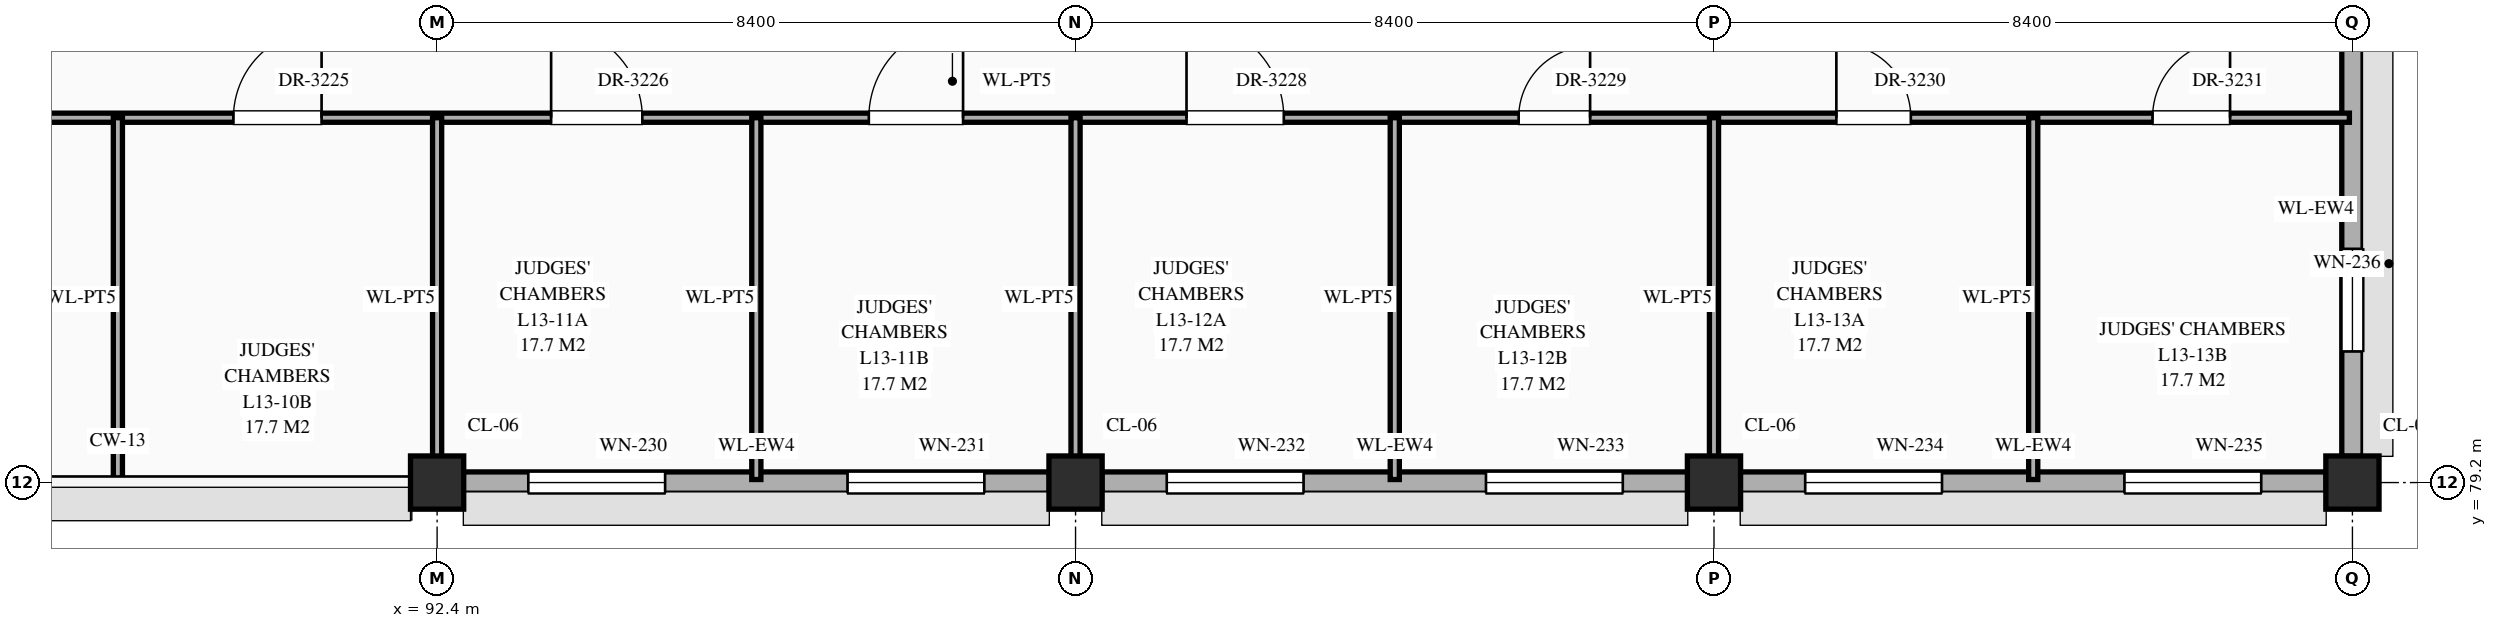
"""IFC4 building model, lengths in metres.
Left out: names, types, materials, properties, quantities, classifications, styles, units other than length and angle.
Written with IfcOpenShell. Run it as: python <this file> out.ifc"""

import sys

from ifc_helpers import new_model, si_unit, direction, frame, frame_2d, origin, origin_2d, place, context, subcontext, project, spatial, rectangle, extrude, element, fill, save


model = new_model("IFC4")
c1 = context("Model", 3, precision=1e-05, world=origin(), true_north=direction((0.0, 1.0)))
c2 = subcontext(c1, "Body", "Model", "MODEL_VIEW")
j1 = project(units=[si_unit("LENGTHUNIT", "METRE"), si_unit("PLANEANGLEUNIT", "RADIAN")], contexts=[c1])
p1 = place(None, origin())
s1 = spatial("IfcSite", under=j1, at=p1, CompositionType="ELEMENT")
p2 = place(p1, origin())
s2 = spatial("IfcBuilding", under=s1, at=p2, CompositionType="ELEMENT")
p3 = place(p2, frame((0.0, 0.0, 56.1)))
s3 = spatial("IfcBuildingStorey", under=s2, at=p3, CompositionType="ELEMENT", Elevation=56.1)
for number, where, z_axis, x_axis in (
    (1, (92.4, 79.2, 0.0), (0.0, 0.0, 1.0), (1.0, 0.0, 0.0)),
    (2, (100.8, 79.2, 0.0), (0.0, 0.0, 1.0), (1.0, 0.0, 0.0)),
    (3, (109.2, 79.2, 0.0), (0.0, 0.0, 1.0), (1.0, 0.0, 0.0)),
    (4, (117.6, 79.2, 0.0), (0.0, 0.0, 1.0), (1.0, 0.0, 0.0)),
):
    element("IfcColumn", number, at=place(p3, frame(where, z_axis=z_axis, x_axis=x_axis)), inside=s3, PredefinedType="COLUMN", context=c2, shape_type="SweptSolid", body=[
        extrude(rectangle(XDim=0.7, YDim=0.7, at=origin_2d()), origin(), (0.0, 0.0, 1.0), 4.2),
    ])
p4 = place(p3, frame((92.745, 79.2, 0.0), z_axis=(0.0, 0.0, 1.0), x_axis=(1.0, 0.0, 0.0)))
e5 = element("IfcWall", 5, at=p4, inside=s3, PredefinedType="STANDARD", context=c2, shape_type="SweptSolid", body=[
    extrude(rectangle(XDim=7.71, YDim=0.28, at=frame_2d((3.855, 0.0))), origin(), (0.0, 0.0, 1.0), 3.31),
])
p5 = place(p4, frame((0.855, 0.0, 0.55)))
e6 = element("IfcOpeningElement", 6, at=p5, cuts=e5, PredefinedType="OPENING", context=c2, shape_type="SweptSolid", body=[
    extrude(rectangle(XDim=1.8, YDim=2.12, at=frame_2d((0.9, 1.06))), frame((0.0, 0.152, 0.0), z_axis=(0.0, -1.0, 0.0), x_axis=(1.0, 0.0, 0.0)), (0.0, 0.0, 1.0), 0.304),
])
p6 = place(p4, frame((5.055, 0.0, 0.55)))
e7 = element("IfcOpeningElement", 7, at=p6, cuts=e5, PredefinedType="OPENING", context=c2, shape_type="SweptSolid", body=[
    extrude(rectangle(XDim=1.8, YDim=2.12, at=frame_2d((0.9, 1.06))), frame((0.0, 0.152, 0.0), z_axis=(0.0, -1.0, 0.0), x_axis=(1.0, 0.0, 0.0)), (0.0, 0.0, 1.0), 0.304),
])
p7 = place(p3, frame((101.145, 79.2, 0.0), z_axis=(0.0, 0.0, 1.0), x_axis=(1.0, 0.0, 0.0)))
e8 = element("IfcWall", 8, at=p7, inside=s3, PredefinedType="STANDARD", context=c2, shape_type="SweptSolid", body=[
    extrude(rectangle(XDim=7.71, YDim=0.28, at=frame_2d((3.855, 0.0))), origin(), (0.0, 0.0, 1.0), 3.31),
])
p8 = place(p7, frame((0.855, 0.0, 0.55)))
e9 = element("IfcOpeningElement", 9, at=p8, cuts=e8, PredefinedType="OPENING", context=c2, shape_type="SweptSolid", body=[
    extrude(rectangle(XDim=1.8, YDim=2.12, at=frame_2d((0.9, 1.06))), frame((0.0, 0.152, 0.0), z_axis=(0.0, -1.0, 0.0), x_axis=(1.0, 0.0, 0.0)), (0.0, 0.0, 1.0), 0.304),
])
p9 = place(p7, frame((5.055, 0.0, 0.55)))
e10 = element("IfcOpeningElement", 10, at=p9, cuts=e8, PredefinedType="OPENING", context=c2, shape_type="SweptSolid", body=[
    extrude(rectangle(XDim=1.8, YDim=2.12, at=frame_2d((0.9, 1.06))), frame((0.0, 0.152, 0.0), z_axis=(0.0, -1.0, 0.0), x_axis=(1.0, 0.0, 0.0)), (0.0, 0.0, 1.0), 0.304),
])
p10 = place(p3, frame((109.545, 79.2, 0.0), z_axis=(0.0, 0.0, 1.0), x_axis=(1.0, 0.0, 0.0)))
e11 = element("IfcWall", 11, at=p10, inside=s3, PredefinedType="STANDARD", context=c2, shape_type="SweptSolid", body=[
    extrude(rectangle(XDim=7.71, YDim=0.28, at=frame_2d((3.855, 0.0))), origin(), (0.0, 0.0, 1.0), 3.2),
])
p11 = place(p10, frame((0.855, 0.0, 0.55)))
e12 = element("IfcOpeningElement", 12, at=p11, cuts=e11, PredefinedType="OPENING", context=c2, shape_type="SweptSolid", body=[
    extrude(rectangle(XDim=1.8, YDim=2.12, at=frame_2d((0.9, 1.06))), frame((0.0, 0.152, 0.0), z_axis=(0.0, -1.0, 0.0), x_axis=(1.0, 0.0, 0.0)), (0.0, 0.0, 1.0), 0.304),
])
p12 = place(p10, frame((5.055, 0.0, 0.55)))
e13 = element("IfcOpeningElement", 13, at=p12, cuts=e11, PredefinedType="OPENING", context=c2, shape_type="SweptSolid", body=[
    extrude(rectangle(XDim=1.8, YDim=2.12, at=frame_2d((0.9, 1.06))), frame((0.0, 0.152, 0.0), z_axis=(0.0, -1.0, 0.0), x_axis=(1.0, 0.0, 0.0)), (0.0, 0.0, 1.0), 0.304),
])
p13 = place(p3, frame((117.6, 79.545, 0.0), z_axis=(0.0, 0.0, 1.0), x_axis=(0.0, 1.0, 0.0)))
e14 = element("IfcWall", 14, at=p13, inside=s3, PredefinedType="STANDARD", context=c2, shape_type="SweptSolid", body=[
    extrude(rectangle(XDim=6.51, YDim=0.28, at=frame_2d((3.255, 0.0))), origin(), (0.0, 0.0, 1.0), 3.2),
])
p14 = place(p13, frame((1.38, 0.0, 0.55)))
e15 = element("IfcOpeningElement", 15, at=p14, cuts=e14, PredefinedType="OPENING", context=c2, shape_type="SweptSolid", body=[
    extrude(rectangle(XDim=1.35, YDim=1.2, at=frame_2d((0.675, 0.6))), frame((0.0, 0.152, 0.0), z_axis=(0.0, -1.0, 0.0), x_axis=(1.0, 0.0, 0.0)), (0.0, 0.0, 1.0), 0.304),
])
p15 = place(p3, frame((50.44, 84.0, 0.0), z_axis=(0.0, 0.0, 1.0), x_axis=(1.0, 0.0, 0.0)))
e16 = element("IfcWall", 16, at=p15, inside=s3, PredefinedType="STANDARD", context=c2, shape_type="SweptSolid", body=[
    extrude(rectangle(XDim=67.12, YDim=0.12, at=frame_2d((33.56, 0.0))), origin(), (0.0, 0.0, 1.0), 3.96),
])
p16 = place(p15, frame((1.51, 0.0, 0.0)))
e17 = element("IfcOpeningElement", 17, at=p16, cuts=e16, PredefinedType="OPENING", context=c2, shape_type="SweptSolid", body=[
    extrude(rectangle(XDim=1.14, YDim=2.4, at=frame_2d((0.57, 1.2))), frame((0.0, 0.072, 0.0), z_axis=(0.0, -1.0, 0.0), x_axis=(1.0, 0.0, 0.0)), (0.0, 0.0, 1.0), 0.144),
])
p17 = place(p15, frame((5.81, 0.0, 0.0)))
e18 = element("IfcOpeningElement", 18, at=p17, cuts=e16, PredefinedType="OPENING", context=c2, shape_type="SweptSolid", body=[
    extrude(rectangle(XDim=0.9, YDim=2.15, at=frame_2d((0.45, 1.075))), frame((0.0, 0.072, 0.0), z_axis=(0.0, -1.0, 0.0), x_axis=(1.0, 0.0, 0.0)), (0.0, 0.0, 1.0), 0.144),
])
p18 = place(p15, frame((10.03, 0.0, 0.0)))
e19 = element("IfcOpeningElement", 19, at=p18, cuts=e16, PredefinedType="OPENING", context=c2, shape_type="SweptSolid", body=[
    extrude(rectangle(XDim=0.86, YDim=2.1, at=frame_2d((0.43, 1.05))), frame((0.0, 0.072, 0.0), z_axis=(0.0, -1.0, 0.0), x_axis=(1.0, 0.0, 0.0)), (0.0, 0.0, 1.0), 0.144),
])
p19 = place(p15, frame((14.2, 0.0, 0.0)))
e20 = element("IfcOpeningElement", 20, at=p19, cuts=e16, PredefinedType="OPENING", context=c2, shape_type="SweptSolid", body=[
    extrude(rectangle(XDim=0.92, YDim=2.15, at=frame_2d((0.46, 1.075))), frame((0.0, 0.072, 0.0), z_axis=(0.0, -1.0, 0.0), x_axis=(1.0, 0.0, 0.0)), (0.0, 0.0, 1.0), 0.144),
])
p20 = place(p15, frame((18.38, 0.0, 0.0)))
e21 = element("IfcOpeningElement", 21, at=p20, cuts=e16, PredefinedType="OPENING", context=c2, shape_type="SweptSolid", body=[
    extrude(rectangle(XDim=0.96, YDim=2.2, at=frame_2d((0.48, 1.1))), frame((0.0, 0.072, 0.0), z_axis=(0.0, -1.0, 0.0), x_axis=(1.0, 0.0, 0.0)), (0.0, 0.0, 1.0), 0.144),
])
p21 = place(p15, frame((22.56, 0.0, 0.0)))
e22 = element("IfcOpeningElement", 22, at=p21, cuts=e16, PredefinedType="OPENING", context=c2, shape_type="SweptSolid", body=[
    extrude(rectangle(XDim=1.0, YDim=2.25, at=frame_2d((0.5, 1.125))), frame((0.0, 0.072, 0.0), z_axis=(0.0, -1.0, 0.0), x_axis=(1.0, 0.0, 0.0)), (0.0, 0.0, 1.0), 0.144),
])
p22 = place(p15, frame((26.74, 0.0, 0.0)))
e23 = element("IfcOpeningElement", 23, at=p22, cuts=e16, PredefinedType="OPENING", context=c2, shape_type="SweptSolid", body=[
    extrude(rectangle(XDim=1.04, YDim=2.2, at=frame_2d((0.52, 1.1))), frame((0.0, 0.072, 0.0), z_axis=(0.0, -1.0, 0.0), x_axis=(1.0, 0.0, 0.0)), (0.0, 0.0, 1.0), 0.144),
])
p23 = place(p15, frame((30.92, 0.0, 0.0)))
e24 = element("IfcOpeningElement", 24, at=p23, cuts=e16, PredefinedType="OPENING", context=c2, shape_type="SweptSolid", body=[
    extrude(rectangle(XDim=1.08, YDim=2.25, at=frame_2d((0.54, 1.125))), frame((0.0, 0.072, 0.0), z_axis=(0.0, -1.0, 0.0), x_axis=(1.0, 0.0, 0.0)), (0.0, 0.0, 1.0), 0.144),
])
p24 = place(p15, frame((35.1, 0.0, 0.0)))
e25 = element("IfcOpeningElement", 25, at=p24, cuts=e16, PredefinedType="OPENING", context=c2, shape_type="SweptSolid", body=[
    extrude(rectangle(XDim=1.12, YDim=2.25, at=frame_2d((0.56, 1.125))), frame((0.0, 0.072, 0.0), z_axis=(0.0, -1.0, 0.0), x_axis=(1.0, 0.0, 0.0)), (0.0, 0.0, 1.0), 0.144),
])
p25 = place(p15, frame((39.28, 0.0, 0.0)))
e26 = element("IfcOpeningElement", 26, at=p25, cuts=e16, PredefinedType="OPENING", context=c2, shape_type="SweptSolid", body=[
    extrude(rectangle(XDim=1.16, YDim=2.3, at=frame_2d((0.58, 1.15))), frame((0.0, 0.072, 0.0), z_axis=(0.0, -1.0, 0.0), x_axis=(1.0, 0.0, 0.0)), (0.0, 0.0, 1.0), 0.144),
])
p26 = place(p15, frame((43.46, 0.0, 0.0)))
e27 = element("IfcOpeningElement", 27, at=p26, cuts=e16, PredefinedType="OPENING", context=c2, shape_type="SweptSolid", body=[
    extrude(rectangle(XDim=1.2, YDim=2.35, at=frame_2d((0.6, 1.175))), frame((0.0, 0.072, 0.0), z_axis=(0.0, -1.0, 0.0), x_axis=(1.0, 0.0, 0.0)), (0.0, 0.0, 1.0), 0.144),
])
p27 = place(p15, frame((47.64, 0.0, 0.0)))
e28 = element("IfcOpeningElement", 28, at=p27, cuts=e16, PredefinedType="OPENING", context=c2, shape_type="SweptSolid", body=[
    extrude(rectangle(XDim=1.24, YDim=2.3, at=frame_2d((0.62, 1.15))), frame((0.0, 0.072, 0.0), z_axis=(0.0, -1.0, 0.0), x_axis=(1.0, 0.0, 0.0)), (0.0, 0.0, 1.0), 0.144),
])
p28 = place(p15, frame((51.82, 0.0, 0.0)))
e29 = element("IfcOpeningElement", 29, at=p28, cuts=e16, PredefinedType="OPENING", context=c2, shape_type="SweptSolid", body=[
    extrude(rectangle(XDim=1.28, YDim=2.35, at=frame_2d((0.64, 1.175))), frame((0.0, 0.072, 0.0), z_axis=(0.0, -1.0, 0.0), x_axis=(1.0, 0.0, 0.0)), (0.0, 0.0, 1.0), 0.144),
])
p29 = place(p15, frame((56.19, 0.0, 0.0)))
e30 = element("IfcOpeningElement", 30, at=p29, cuts=e16, PredefinedType="OPENING", context=c2, shape_type="SweptSolid", body=[
    extrude(rectangle(XDim=0.94, YDim=2.3, at=frame_2d((0.47, 1.15))), frame((0.0, 0.072, 0.0), z_axis=(0.0, -1.0, 0.0), x_axis=(1.0, 0.0, 0.0)), (0.0, 0.0, 1.0), 0.144),
])
p30 = place(p15, frame((60.37, 0.0, 0.0)))
e31 = element("IfcOpeningElement", 31, at=p30, cuts=e16, PredefinedType="OPENING", context=c2, shape_type="SweptSolid", body=[
    extrude(rectangle(XDim=0.98, YDim=2.35, at=frame_2d((0.49, 1.175))), frame((0.0, 0.072, 0.0), z_axis=(0.0, -1.0, 0.0), x_axis=(1.0, 0.0, 0.0)), (0.0, 0.0, 1.0), 0.144),
])
p31 = place(p15, frame((64.53, 0.0, 0.0)))
e32 = element("IfcOpeningElement", 32, at=p31, cuts=e16, PredefinedType="OPENING", context=c2, shape_type="SweptSolid", body=[
    extrude(rectangle(XDim=1.02, YDim=2.4, at=frame_2d((0.51, 1.2))), frame((0.0, 0.072, 0.0), z_axis=(0.0, -1.0, 0.0), x_axis=(1.0, 0.0, 0.0)), (0.0, 0.0, 1.0), 0.144),
])
p32 = place(p3, frame((88.2, 79.24, 0.0), z_axis=(0.0, 0.0, 1.0), x_axis=(0.0, 1.0, 0.0)))
e33 = element("IfcWall", 33, at=p32, inside=s3, PredefinedType="STANDARD", context=c2, shape_type="SweptSolid", body=[
    extrude(rectangle(XDim=4.76, YDim=0.12, at=frame_2d((2.38, 0.0))), origin(), (0.0, 0.0, 1.0), 3.96),
])
p33 = place(p3, frame((92.4, 79.24, 0.0), z_axis=(0.0, 0.0, 1.0), x_axis=(0.0, 1.0, 0.0)))
e34 = element("IfcWall", 34, at=p33, inside=s3, PredefinedType="STANDARD", context=c2, shape_type="SweptSolid", body=[
    extrude(rectangle(XDim=4.76, YDim=0.12, at=frame_2d((2.38, 0.0))), origin(), (0.0, 0.0, 1.0), 3.21),
])
p34 = place(p3, frame((96.6, 79.24, 0.0), z_axis=(0.0, 0.0, 1.0), x_axis=(0.0, 1.0, 0.0)))
e35 = element("IfcWall", 35, at=p34, inside=s3, PredefinedType="STANDARD", context=c2, shape_type="SweptSolid", body=[
    extrude(rectangle(XDim=4.76, YDim=0.12, at=frame_2d((2.38, 0.0))), origin(), (0.0, 0.0, 1.0), 3.61),
])
p35 = place(p3, frame((100.8, 79.24, 0.0), z_axis=(0.0, 0.0, 1.0), x_axis=(0.0, 1.0, 0.0)))
e36 = element("IfcWall", 36, at=p35, inside=s3, PredefinedType="STANDARD", context=c2, shape_type="SweptSolid", body=[
    extrude(rectangle(XDim=4.76, YDim=0.12, at=frame_2d((2.38, 0.0))), origin(), (0.0, 0.0, 1.0), 3.21),
])
p36 = place(p3, frame((105.0, 79.24, 0.0), z_axis=(0.0, 0.0, 1.0), x_axis=(0.0, 1.0, 0.0)))
e37 = element("IfcWall", 37, at=p36, inside=s3, PredefinedType="STANDARD", context=c2, shape_type="SweptSolid", body=[
    extrude(rectangle(XDim=4.76, YDim=0.12, at=frame_2d((2.38, 0.0))), origin(), (0.0, 0.0, 1.0), 3.96),
])
p37 = place(p3, frame((109.2, 79.24, 0.0), z_axis=(0.0, 0.0, 1.0), x_axis=(0.0, 1.0, 0.0)))
e38 = element("IfcWall", 38, at=p37, inside=s3, PredefinedType="STANDARD", context=c2, shape_type="SweptSolid", body=[
    extrude(rectangle(XDim=4.76, YDim=0.12, at=frame_2d((2.38, 0.0))), origin(), (0.0, 0.0, 1.0), 3.1),
])
p38 = place(p3, frame((113.4, 79.24, 0.0), z_axis=(0.0, 0.0, 1.0), x_axis=(0.0, 1.0, 0.0)))
e39 = element("IfcWall", 39, at=p38, inside=s3, PredefinedType="STANDARD", context=c2, shape_type="SweptSolid", body=[
    extrude(rectangle(XDim=4.76, YDim=0.12, at=frame_2d((2.38, 0.0))), origin(), (0.0, 0.0, 1.0), 3.5),
])
p39 = place(p5, origin())
e40 = element("IfcWindow", 40, at=p39, inside=s3, PartitioningType="SINGLE_PANEL", PredefinedType="WINDOW", context=c2, shape_type="SweptSolid", body=[
    extrude(rectangle(XDim=1.8, YDim=2.12, at=frame_2d((0.9, 1.06))), frame((0.0, 0.03, 0.0), z_axis=(0.0, -1.0, 0.0), x_axis=(1.0, 0.0, 0.0)), (0.0, 0.0, 1.0), 0.06),
])
fill(e6, e40)
p40 = place(p6, origin())
e41 = element("IfcWindow", 41, at=p40, inside=s3, PartitioningType="SINGLE_PANEL", PredefinedType="WINDOW", context=c2, shape_type="SweptSolid", body=[
    extrude(rectangle(XDim=1.8, YDim=2.12, at=frame_2d((0.9, 1.06))), frame((0.0, 0.03, 0.0), z_axis=(0.0, -1.0, 0.0), x_axis=(1.0, 0.0, 0.0)), (0.0, 0.0, 1.0), 0.06),
])
fill(e7, e41)
p41 = place(p8, origin())
e42 = element("IfcWindow", 42, at=p41, inside=s3, PartitioningType="SINGLE_PANEL", PredefinedType="WINDOW", context=c2, shape_type="SweptSolid", body=[
    extrude(rectangle(XDim=1.8, YDim=2.12, at=frame_2d((0.9, 1.06))), frame((0.0, 0.03, 0.0), z_axis=(0.0, -1.0, 0.0), x_axis=(1.0, 0.0, 0.0)), (0.0, 0.0, 1.0), 0.06),
])
fill(e9, e42)
p42 = place(p9, origin())
e43 = element("IfcWindow", 43, at=p42, inside=s3, PartitioningType="SINGLE_PANEL", PredefinedType="WINDOW", context=c2, shape_type="SweptSolid", body=[
    extrude(rectangle(XDim=1.8, YDim=2.12, at=frame_2d((0.9, 1.06))), frame((0.0, 0.03, 0.0), z_axis=(0.0, -1.0, 0.0), x_axis=(1.0, 0.0, 0.0)), (0.0, 0.0, 1.0), 0.06),
])
fill(e10, e43)
p43 = place(p11, origin())
e44 = element("IfcWindow", 44, at=p43, inside=s3, PartitioningType="SINGLE_PANEL", PredefinedType="WINDOW", context=c2, shape_type="SweptSolid", body=[
    extrude(rectangle(XDim=1.8, YDim=2.12, at=frame_2d((0.9, 1.06))), frame((0.0, 0.03, 0.0), z_axis=(0.0, -1.0, 0.0), x_axis=(1.0, 0.0, 0.0)), (0.0, 0.0, 1.0), 0.06),
])
fill(e12, e44)
p44 = place(p12, origin())
e45 = element("IfcWindow", 45, at=p44, inside=s3, PartitioningType="SINGLE_PANEL", PredefinedType="WINDOW", context=c2, shape_type="SweptSolid", body=[
    extrude(rectangle(XDim=1.8, YDim=2.12, at=frame_2d((0.9, 1.06))), frame((0.0, 0.03, 0.0), z_axis=(0.0, -1.0, 0.0), x_axis=(1.0, 0.0, 0.0)), (0.0, 0.0, 1.0), 0.06),
])
fill(e13, e45)
p45 = place(p14, origin())
e46 = element("IfcWindow", 46, at=p45, inside=s3, PartitioningType="SINGLE_PANEL", PredefinedType="WINDOW", context=c2, shape_type="SweptSolid", body=[
    extrude(rectangle(XDim=1.35, YDim=1.2, at=frame_2d((0.675, 0.6))), frame((0.0, 0.03, 0.0), z_axis=(0.0, -1.0, 0.0), x_axis=(1.0, 0.0, 0.0)), (0.0, 0.0, 1.0), 0.06),
])
fill(e15, e46)
p46 = place(p25, origin())
e47 = element("IfcDoor", 47, at=p46, inside=s3, OperationType="SINGLE_SWING_RIGHT", PredefinedType="DOOR", context=c2, shape_type="SweptSolid", body=[
    extrude(rectangle(XDim=1.16, YDim=2.3, at=frame_2d((0.58, 1.15))), frame((0.0, 0.025, 0.0), z_axis=(0.0, -1.0, 0.0), x_axis=(1.0, 0.0, 0.0)), (0.0, 0.0, 1.0), 0.05),
])
fill(e26, e47)
p47 = place(p26, origin())
e48 = element("IfcDoor", 48, at=p47, inside=s3, OperationType="SINGLE_SWING_LEFT", PredefinedType="DOOR", context=c2, shape_type="SweptSolid", body=[
    extrude(rectangle(XDim=1.2, YDim=2.35, at=frame_2d((0.6, 1.175))), frame((0.0, 0.025, 0.0), z_axis=(0.0, -1.0, 0.0), x_axis=(1.0, 0.0, 0.0)), (0.0, 0.0, 1.0), 0.05),
])
fill(e27, e48)
p48 = place(p27, origin())
e49 = element("IfcDoor", 49, at=p48, inside=s3, OperationType="SINGLE_SWING_RIGHT", PredefinedType="DOOR", context=c2, shape_type="SweptSolid", body=[
    extrude(rectangle(XDim=1.24, YDim=2.3, at=frame_2d((0.62, 1.15))), frame((0.0, 0.025, 0.0), z_axis=(0.0, -1.0, 0.0), x_axis=(1.0, 0.0, 0.0)), (0.0, 0.0, 1.0), 0.05),
])
fill(e28, e49)
p49 = place(p28, origin())
e50 = element("IfcDoor", 50, at=p49, inside=s3, OperationType="SINGLE_SWING_LEFT", PredefinedType="DOOR", context=c2, shape_type="SweptSolid", body=[
    extrude(rectangle(XDim=1.28, YDim=2.35, at=frame_2d((0.64, 1.175))), frame((0.0, 0.025, 0.0), z_axis=(0.0, -1.0, 0.0), x_axis=(1.0, 0.0, 0.0)), (0.0, 0.0, 1.0), 0.05),
])
fill(e29, e50)
p50 = place(p29, origin())
e51 = element("IfcDoor", 51, at=p50, inside=s3, OperationType="SINGLE_SWING_RIGHT", PredefinedType="DOOR", context=c2, shape_type="SweptSolid", body=[
    extrude(rectangle(XDim=0.94, YDim=2.3, at=frame_2d((0.47, 1.15))), frame((0.0, 0.025, 0.0), z_axis=(0.0, -1.0, 0.0), x_axis=(1.0, 0.0, 0.0)), (0.0, 0.0, 1.0), 0.05),
])
fill(e30, e51)
p51 = place(p30, origin())
e52 = element("IfcDoor", 52, at=p51, inside=s3, OperationType="SINGLE_SWING_LEFT", PredefinedType="DOOR", context=c2, shape_type="SweptSolid", body=[
    extrude(rectangle(XDim=0.98, YDim=2.35, at=frame_2d((0.49, 1.175))), frame((0.0, 0.025, 0.0), z_axis=(0.0, -1.0, 0.0), x_axis=(1.0, 0.0, 0.0)), (0.0, 0.0, 1.0), 0.05),
])
fill(e31, e52)
p52 = place(p31, origin())
e53 = element("IfcDoor", 53, at=p52, inside=s3, OperationType="SINGLE_SWING_RIGHT", PredefinedType="DOOR", context=c2, shape_type="SweptSolid", body=[
    extrude(rectangle(XDim=1.02, YDim=2.4, at=frame_2d((0.51, 1.2))), frame((0.0, 0.025, 0.0), z_axis=(0.0, -1.0, 0.0), x_axis=(1.0, 0.0, 0.0)), (0.0, 0.0, 1.0), 0.05),
])
fill(e32, e53)
save(model, sys.argv[1])
